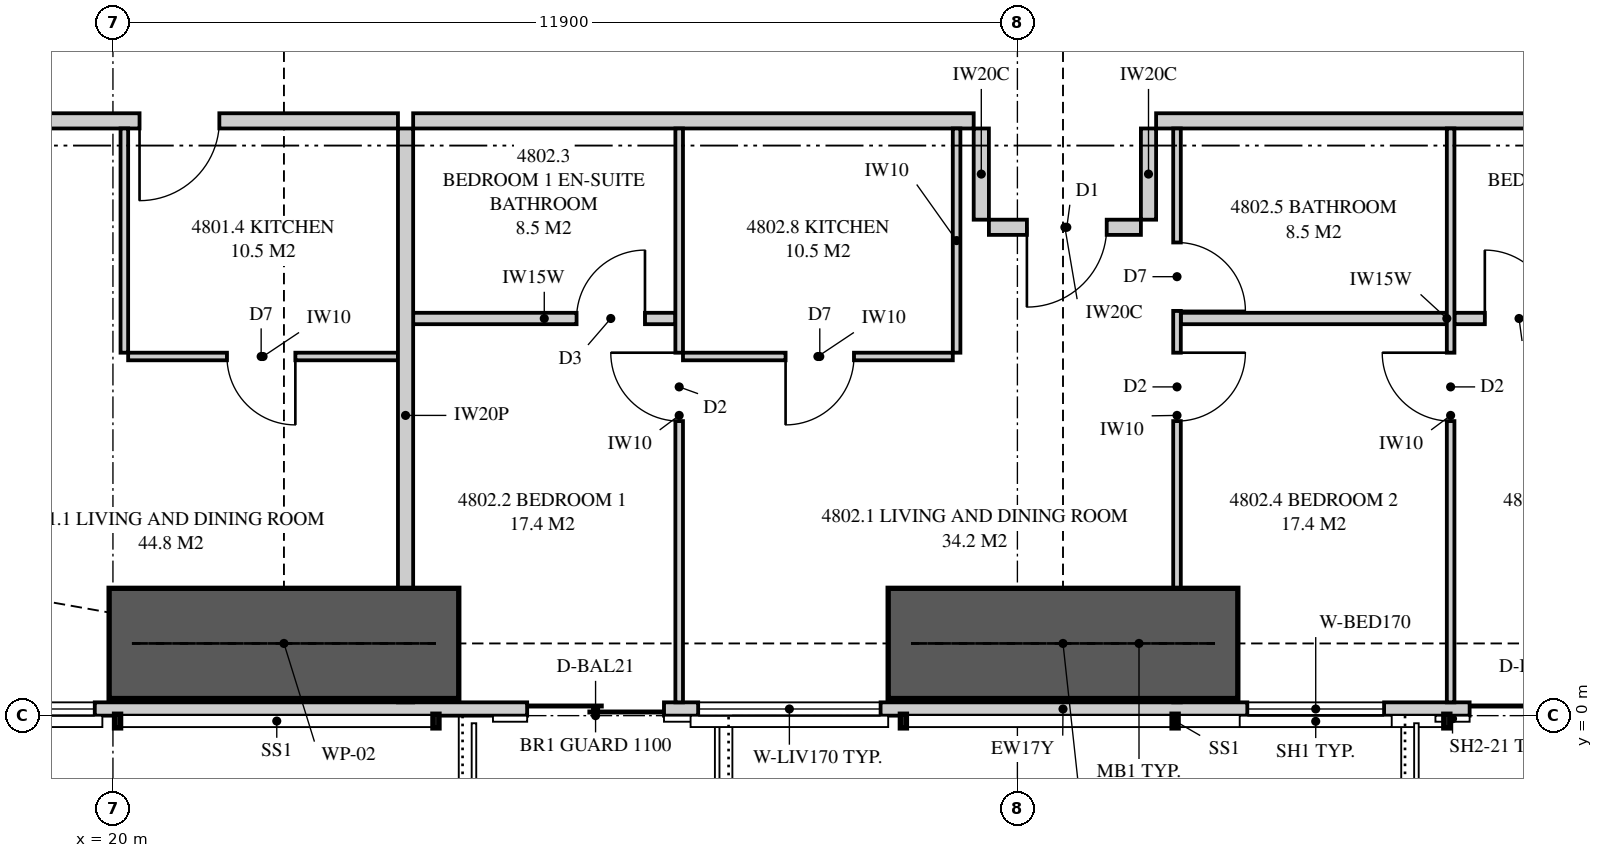
"""IFC4 building model, lengths in metres.
Left out: names, types, materials, properties, quantities, classifications, styles, units other than length and angle.
Written with IfcOpenShell. Run it as: python <this file> out.ifc"""

import sys

from ifc_helpers import new_model, si_unit, direction, frame, frame_2d, origin, place, context, subcontext, project, spatial, polyline, rectangle, outline, extrude, element, fill, save


model = new_model("IFC4")
c1 = context("Model", 3, precision=1e-05, world=origin(), true_north=direction((0.0, 1.0)))
c2 = subcontext(c1, "Body", "Model", "MODEL_VIEW")
j1 = project(units=[si_unit("LENGTHUNIT", "METRE"), si_unit("PLANEANGLEUNIT", "RADIAN")], contexts=[c1])
p1 = place(None, origin())
s1 = spatial("IfcSite", under=j1, at=p1, CompositionType="ELEMENT")
p2 = place(p1, origin())
s2 = spatial("IfcBuilding", under=s1, at=p2, CompositionType="ELEMENT")
p3 = place(p2, frame((0.0, 0.0, 177.8)))
s3 = spatial("IfcBuildingStorey", under=s2, at=p3, CompositionType="ELEMENT", Elevation=177.8)
p4 = place(p3, frame((15.051, 0.087, 0.0), z_axis=(0.0, 0.0, 1.0), x_axis=(1.0, 0.0, 0.0)))
e1 = element("IfcWall", 1, at=p4, inside=s3, PredefinedType="SOLIDWALL", context=c2, shape_type="SweptSolid", body=[
    extrude(outline(polyline([(0.0, 0.0), (34.897, 0.0), (34.897, 3.11), (27.91, 3.11), (27.91, 2.15), (27.836, 2.15), (27.836, 3.11), (27.699, 3.11), (27.699, 2.15), (7.199, 2.15), (7.199, 3.11), (7.062, 3.11), (7.062, 2.15), (6.987, 2.15), (6.987, 3.11), (0.0, 3.11), (0.0, 0.0)])), frame((0.0, 0.087, 0.0), z_axis=(0.0, -1.0, 0.0), x_axis=(1.0, 0.0, 0.0)), (0.0, 0.0, 1.0), 0.175),
])
p5 = place(p4, frame((2.31, 0.0, 0.4)))
e2 = element("IfcOpeningElement", 2, at=p5, cuts=e1, PredefinedType="OPENING", context=c2, shape_type="SweptSolid", body=[
    extrude(rectangle(XDim=2.4, YDim=1.7, at=frame_2d((1.2, 0.85))), frame((0.0, 0.097, 0.0), z_axis=(0.0, -1.0, 0.0), x_axis=(1.0, 0.0, 0.0)), (0.0, 0.0, 1.0), 0.195),
])
p6 = place(p4, frame((10.399, 0.0, 0.0)))
e3 = element("IfcOpeningElement", 3, at=p6, cuts=e1, PredefinedType="OPENING", context=c2, shape_type="SweptSolid", body=[
    extrude(rectangle(XDim=1.8, YDim=2.1, at=frame_2d((0.9, 1.05))), frame((0.0, 0.097, 0.0), z_axis=(0.0, -1.0, 0.0), x_axis=(1.0, 0.0, 0.0)), (0.0, 0.0, 1.0), 0.195),
])
p7 = place(p4, frame((12.649, 0.0, 0.4)))
e4 = element("IfcOpeningElement", 4, at=p7, cuts=e1, PredefinedType="OPENING", context=c2, shape_type="SweptSolid", body=[
    extrude(rectangle(XDim=2.4, YDim=1.7, at=frame_2d((1.2, 0.85))), frame((0.0, 0.097, 0.0), z_axis=(0.0, -1.0, 0.0), x_axis=(1.0, 0.0, 0.0)), (0.0, 0.0, 1.0), 0.195),
])
p8 = place(p4, frame((19.874, 0.0, 0.4)))
e5 = element("IfcOpeningElement", 5, at=p8, cuts=e1, PredefinedType="OPENING", context=c2, shape_type="SweptSolid", body=[
    extrude(rectangle(XDim=1.8, YDim=1.7, at=frame_2d((0.9, 0.85))), frame((0.0, 0.097, 0.0), z_axis=(0.0, -1.0, 0.0), x_axis=(1.0, 0.0, 0.0)), (0.0, 0.0, 1.0), 0.195),
])
p9 = place(p4, frame((22.799, 0.0, 0.0)))
e6 = element("IfcOpeningElement", 6, at=p9, cuts=e1, PredefinedType="OPENING", context=c2, shape_type="SweptSolid", body=[
    extrude(rectangle(XDim=1.8, YDim=2.1, at=frame_2d((0.9, 1.05))), frame((0.0, 0.097, 0.0), z_axis=(0.0, -1.0, 0.0), x_axis=(1.0, 0.0, 0.0)), (0.0, 0.0, 1.0), 0.195),
])
p10 = place(p4, frame((30.205, 0.0, 0.4)))
e7 = element("IfcOpeningElement", 7, at=p10, cuts=e1, PredefinedType="OPENING", context=c2, shape_type="SweptSolid", body=[
    extrude(rectangle(XDim=2.4, YDim=1.7, at=frame_2d((1.2, 0.85))), frame((0.0, 0.097, 0.0), z_axis=(0.0, -1.0, 0.0), x_axis=(1.0, 0.0, 0.0)), (0.0, 0.0, 1.0), 0.195),
])
p11 = place(p3, frame((23.85, 0.175, 0.0), z_axis=(0.0, 0.0, 1.0), x_axis=(0.0, 1.0, 0.0)))
e8 = element("IfcWall", 8, at=p11, inside=s3, PredefinedType="PARTITIONING", context=c2, shape_type="SweptSolid", body=[
    extrude(outline(polyline([(0.529, 2.15), (0.0, 2.15), (0.0, 0.0), (0.529, 0.0), (0.529, 0.206), (1.021, 0.206), (1.021, 0.0), (7.55, 0.0), (7.55, 3.11), (1.685, 3.11), (1.685, 2.15), (1.021, 2.15), (1.021, 1.944), (0.529, 1.944), (0.529, 2.15)])), frame((0.0, 0.1, 0.0), z_axis=(0.0, -1.0, 0.0), x_axis=(1.0, 0.0, 0.0)), (0.0, 0.0, 1.0), 0.2),
])
p12 = place(p3, frame((17.85, 7.825, 0.0), z_axis=(0.0, 0.0, 1.0), x_axis=(1.0, 0.0, 0.0)))
e9 = element("IfcWall", 9, at=p12, inside=s3, PredefinedType="PARTITIONING", context=c2, shape_type="SweptSolid", body=[
    extrude(outline(polyline([(0.0, 0.0), (5.9, 0.0), (5.9, 3.11), (4.737, 3.11), (4.737, 2.541), (4.062, 2.541), (4.062, 3.11), (0.0, 3.11), (0.0, 0.0)])), frame((0.0, 0.1, 0.0), z_axis=(0.0, -1.0, 0.0), x_axis=(1.0, 0.0, 0.0)), (0.0, 0.0, 1.0), 0.2),
])
p13 = place(p12, frame((2.5, 0.0, 0.0)))
e10 = element("IfcOpeningElement", 10, at=p13, cuts=e9, PredefinedType="OPENING", context=c2, shape_type="SweptSolid", body=[
    extrude(rectangle(XDim=1.05, YDim=2.2, at=frame_2d((0.525, 1.1))), frame((0.0, 0.11, 0.0), z_axis=(0.0, -1.0, 0.0), x_axis=(1.0, 0.0, 0.0)), (0.0, 0.0, 1.0), 0.22),
])
p14 = place(p3, frame((20.2, 4.725, 0.0), z_axis=(0.0, 0.0, 1.0), x_axis=(1.0, 0.0, 0.0)))
e11 = element("IfcWall", 11, at=p14, inside=s3, PredefinedType="PARTITIONING", context=c2, shape_type="SweptSolid", body=[
    extrude(outline(polyline([(0.0, 0.0), (3.55, 0.0), (3.55, 3.11), (2.337, 3.11), (2.337, 2.541), (1.763, 2.541), (1.763, 3.11), (0.0, 3.11), (0.0, 0.0)])), frame((0.0, 0.05, 0.0), z_axis=(0.0, -1.0, 0.0), x_axis=(1.0, 0.0, 0.0)), (0.0, 0.0, 1.0), 0.1),
])
p15 = place(p14, frame((1.3, 0.0, 0.0)))
e12 = element("IfcOpeningElement", 12, at=p15, cuts=e11, PredefinedType="OPENING", context=c2, shape_type="SweptSolid", body=[
    extrude(rectangle(XDim=0.9, YDim=2.1, at=frame_2d((0.45, 1.05))), frame((0.0, 0.06, 0.0), z_axis=(0.0, -1.0, 0.0), x_axis=(1.0, 0.0, 0.0)), (0.0, 0.0, 1.0), 0.12),
])
p16 = place(p3, frame((20.15, 4.775, 0.0), z_axis=(0.0, 0.0, 1.0), x_axis=(0.0, 1.0, 0.0)))
e13 = element("IfcWall", 13, at=p16, inside=s3, PredefinedType="PARTITIONING", context=c2, shape_type="SweptSolid", body=[
    extrude(rectangle(XDim=2.95, YDim=0.1, at=frame_2d((1.475, 0.0))), origin(), (0.0, 0.0, 1.0), 3.11),
])
p17 = place(p3, frame((23.95, 7.825, 0.0), z_axis=(0.0, 0.0, 1.0), x_axis=(1.0, 0.0, 0.0)))
e14 = element("IfcWall", 14, at=p17, inside=s3, PredefinedType="PARTITIONING", context=c2, shape_type="SweptSolid", body=[
    extrude(rectangle(XDim=7.375, YDim=0.2, at=frame_2d((3.688, 0.0))), origin(), (0.0, 0.0, 1.0), 3.11),
])
p18 = place(p3, frame((27.45, 0.175, 0.0), z_axis=(0.0, 0.0, 1.0), x_axis=(0.0, 1.0, 0.0)))
e15 = element("IfcWall", 15, at=p18, inside=s3, PredefinedType="PARTITIONING", context=c2, shape_type="SweptSolid", body=[
    extrude(outline(polyline([(0.0, 0.0), (7.55, 0.0), (7.55, 3.11), (1.635, 3.11), (1.635, 2.15), (0.0, 2.15), (0.0, 3.11), (0.0, 0.0)])), frame((0.0, 0.05, 0.0), z_axis=(0.0, -1.0, 0.0), x_axis=(1.0, 0.0, 0.0)), (0.0, 0.0, 1.0), 0.1),
])
p19 = place(p18, frame((3.7, 0.0, 0.0)))
e16 = element("IfcOpeningElement", 16, at=p19, cuts=e15, PredefinedType="OPENING", context=c2, shape_type="SweptSolid", body=[
    extrude(rectangle(XDim=0.9, YDim=2.1, at=frame_2d((0.45, 1.05))), frame((0.0, 0.06, 0.0), z_axis=(0.0, -1.0, 0.0), x_axis=(1.0, 0.0, 0.0)), (0.0, 0.0, 1.0), 0.12),
])
p20 = place(p3, frame((34.0, 0.175, 0.0), z_axis=(0.0, 0.0, 1.0), x_axis=(0.0, 1.0, 0.0)))
e17 = element("IfcWall", 17, at=p20, inside=s3, PredefinedType="PARTITIONING", context=c2, shape_type="SweptSolid", body=[
    extrude(outline(polyline([(0.529, 2.15), (0.0, 2.15), (0.0, 0.0), (0.529, 0.0), (0.529, 0.248), (1.021, 0.248), (1.021, 0.0), (7.55, 0.0), (7.55, 3.11), (1.635, 3.11), (1.635, 2.15), (1.021, 2.15), (1.021, 1.902), (0.529, 1.902), (0.529, 2.15)])), frame((0.0, 0.05, 0.0), z_axis=(0.0, -1.0, 0.0), x_axis=(1.0, 0.0, 0.0)), (0.0, 0.0, 1.0), 0.1),
])
p21 = place(p20, frame((3.7, 0.0, 0.0)))
e18 = element("IfcOpeningElement", 18, at=p21, cuts=e17, PredefinedType="OPENING", context=c2, shape_type="SweptSolid", body=[
    extrude(rectangle(XDim=0.9, YDim=2.1, at=frame_2d((0.45, 1.05))), frame((0.0, 0.06, 0.0), z_axis=(0.0, -1.0, 0.0), x_axis=(1.0, 0.0, 0.0)), (0.0, 0.0, 1.0), 0.12),
])
p22 = place(p20, frame((5.15, 0.0, 0.0)))
e19 = element("IfcOpeningElement", 19, at=p22, cuts=e17, PredefinedType="OPENING", context=c2, shape_type="SweptSolid", body=[
    extrude(rectangle(XDim=0.9, YDim=2.1, at=frame_2d((0.45, 1.05))), frame((0.0, 0.06, 0.0), z_axis=(0.0, -1.0, 0.0), x_axis=(1.0, 0.0, 0.0)), (0.0, 0.0, 1.0), 0.12),
])
p23 = place(p3, frame((37.6, 0.175, 0.0), z_axis=(0.0, 0.0, 1.0), x_axis=(0.0, 1.0, 0.0)))
e20 = element("IfcWall", 20, at=p23, inside=s3, PredefinedType="PARTITIONING", context=c2, shape_type="SweptSolid", body=[
    extrude(outline(polyline([(0.0, 0.0), (7.55, 0.0), (7.55, 3.11), (1.635, 3.11), (1.635, 2.15), (0.0, 2.15), (0.0, 3.11), (0.0, 0.0)])), frame((0.0, 0.05, 0.0), z_axis=(0.0, -1.0, 0.0), x_axis=(1.0, 0.0, 0.0)), (0.0, 0.0, 1.0), 0.1),
])
p24 = place(p23, frame((3.7, 0.0, 0.0)))
e21 = element("IfcOpeningElement", 21, at=p24, cuts=e20, PredefinedType="OPENING", context=c2, shape_type="SweptSolid", body=[
    extrude(rectangle(XDim=0.9, YDim=2.1, at=frame_2d((0.45, 1.05))), frame((0.0, 0.06, 0.0), z_axis=(0.0, -1.0, 0.0), x_axis=(1.0, 0.0, 0.0)), (0.0, 0.0, 1.0), 0.12),
])
p25 = place(p3, frame((23.95, 5.225, 0.0), z_axis=(0.0, 0.0, 1.0), x_axis=(1.0, 0.0, 0.0)))
e22 = element("IfcWall", 22, at=p25, inside=s3, PredefinedType="PLUMBINGWALL", context=c2, shape_type="SweptSolid", body=[
    extrude(rectangle(XDim=3.45, YDim=0.15, at=frame_2d((1.725, 0.0))), origin(), (0.0, 0.0, 1.0), 3.11),
])
p26 = place(p25, frame((2.15, 0.0, 0.0)))
e23 = element("IfcOpeningElement", 23, at=p26, cuts=e22, PredefinedType="OPENING", context=c2, shape_type="SweptSolid", body=[
    extrude(rectangle(XDim=0.9, YDim=2.1, at=frame_2d((0.45, 1.05))), frame((0.0, 0.085, 0.0), z_axis=(0.0, -1.0, 0.0), x_axis=(1.0, 0.0, 0.0)), (0.0, 0.0, 1.0), 0.17),
])
p27 = place(p3, frame((34.05, 5.225, 0.0), z_axis=(0.0, 0.0, 1.0), x_axis=(1.0, 0.0, 0.0)))
e24 = element("IfcWall", 24, at=p27, inside=s3, PredefinedType="PLUMBINGWALL", context=c2, shape_type="SweptSolid", body=[
    extrude(rectangle(XDim=3.5, YDim=0.15, at=frame_2d((1.75, 0.0))), origin(), (0.0, 0.0, 1.0), 3.11),
])
p28 = place(p3, frame((37.65, 5.225, 0.0), z_axis=(0.0, 0.0, 1.0), x_axis=(1.0, 0.0, 0.0)))
e25 = element("IfcWall", 25, at=p28, inside=s3, PredefinedType="PLUMBINGWALL", context=c2, shape_type="SweptSolid", body=[
    extrude(rectangle(XDim=3.45, YDim=0.15, at=frame_2d((1.725, 0.0))), origin(), (0.0, 0.0, 1.0), 3.11),
])
p29 = place(p28, frame((0.4, 0.0, 0.0)))
e26 = element("IfcOpeningElement", 26, at=p29, cuts=e25, PredefinedType="OPENING", context=c2, shape_type="SweptSolid", body=[
    extrude(rectangle(XDim=0.9, YDim=2.1, at=frame_2d((0.45, 1.05))), frame((0.0, 0.085, 0.0), z_axis=(0.0, -1.0, 0.0), x_axis=(1.0, 0.0, 0.0)), (0.0, 0.0, 1.0), 0.17),
])
p30 = place(p3, frame((27.5, 4.725, 0.0), z_axis=(0.0, 0.0, 1.0), x_axis=(1.0, 0.0, 0.0)))
e27 = element("IfcWall", 27, at=p30, inside=s3, PredefinedType="PARTITIONING", context=c2, shape_type="SweptSolid", body=[
    extrude(rectangle(XDim=3.55, YDim=0.1, at=frame_2d((1.775, 0.0))), origin(), (0.0, 0.0, 1.0), 3.11),
])
p31 = place(p30, frame((1.35, 0.0, 0.0)))
e28 = element("IfcOpeningElement", 28, at=p31, cuts=e27, PredefinedType="OPENING", context=c2, shape_type="SweptSolid", body=[
    extrude(rectangle(XDim=0.9, YDim=2.1, at=frame_2d((0.45, 1.05))), frame((0.0, 0.06, 0.0), z_axis=(0.0, -1.0, 0.0), x_axis=(1.0, 0.0, 0.0)), (0.0, 0.0, 1.0), 0.12),
])
p32 = place(p3, frame((31.1, 4.775, 0.0), z_axis=(0.0, 0.0, 1.0), x_axis=(0.0, 1.0, 0.0)))
e29 = element("IfcWall", 29, at=p32, inside=s3, PredefinedType="PARTITIONING", context=c2, shape_type="SweptSolid", body=[
    extrude(rectangle(XDim=2.95, YDim=0.1, at=frame_2d((1.475, 0.0))), origin(), (0.0, 0.0, 1.0), 3.11),
])
p33 = place(p3, frame((33.725, 7.825, 0.0), z_axis=(0.0, 0.0, 1.0), x_axis=(1.0, 0.0, 0.0)))
e30 = element("IfcWall", 30, at=p33, inside=s3, PredefinedType="PARTITIONING", context=c2, shape_type="SweptSolid", body=[
    extrude(rectangle(XDim=7.375, YDim=0.2, at=frame_2d((3.688, 0.0))), origin(), (0.0, 0.0, 1.0), 3.11),
])
p34 = place(p3, frame((31.525, 6.425, 0.0), z_axis=(0.0, 0.0, 1.0), x_axis=(1.0, 0.0, 0.0)))
e31 = element("IfcWall", 31, at=p34, inside=s3, PredefinedType="PARTITIONING", context=c2, shape_type="SweptSolid", body=[
    extrude(outline(polyline([(0.0, 0.0), (2.0, 0.0), (2.0, 3.11), (1.312, 3.11), (1.312, 2.541), (0.638, 2.541), (0.638, 3.11), (0.0, 3.11), (0.0, 0.0)])), frame((0.0, 0.1, 0.0), z_axis=(0.0, -1.0, 0.0), x_axis=(1.0, 0.0, 0.0)), (0.0, 0.0, 1.0), 0.2),
])
p35 = place(p34, frame((0.5, 0.0, 0.0)))
e32 = element("IfcOpeningElement", 32, at=p35, cuts=e31, PredefinedType="OPENING", context=c2, shape_type="SweptSolid", body=[
    extrude(rectangle(XDim=1.05, YDim=2.2, at=frame_2d((0.525, 1.1))), frame((0.0, 0.11, 0.0), z_axis=(0.0, -1.0, 0.0), x_axis=(1.0, 0.0, 0.0)), (0.0, 0.0, 1.0), 0.22),
])
for number, where, z_axis, x_axis in (
    (33, (31.425, 7.725, 0.0), (0.0, 0.0, 1.0), (0.0, -1.0, 0.0)),
    (34, (33.625, 7.725, 0.0), (0.0, 0.0, 1.0), (0.0, -1.0, 0.0)),
):
    element("IfcWall", number, at=place(p3, frame(where, z_axis=z_axis, x_axis=x_axis)), inside=s3, PredefinedType="PARTITIONING", context=c2, shape_type="SweptSolid", body=[
        extrude(rectangle(XDim=1.2, YDim=0.2, at=frame_2d((0.6, 0.0))), origin(), (0.0, 0.0, 1.0), 3.11),
    ])
for number, where, z_axis, x_axis in (
    (35, (19.95, 0.95, 0.0), (0.0, 0.0, 1.0), (1.0, 0.0, 0.0)),
    (36, (30.2, 0.95, 0.0), (0.0, 0.0, 1.0), (1.0, 0.0, 0.0)),
):
    element("IfcWall", number, at=place(p3, frame(where, z_axis=z_axis, x_axis=x_axis)), inside=s3, PredefinedType="SHEAR", context=c2, shape_type="SweptSolid", body=[
        extrude(rectangle(XDim=4.6, YDim=1.45, at=frame_2d((2.3, 0.0))), origin(), (0.0, 0.0, 1.0), 3.35),
    ])
p36 = place(p5, origin())
e37 = element("IfcWindow", 37, at=p36, inside=s3, PartitioningType="SINGLE_PANEL", PredefinedType="WINDOW", context=c2, shape_type="SweptSolid", body=[
    extrude(rectangle(XDim=2.4, YDim=1.7, at=frame_2d((1.2, 0.85))), frame((0.0, 0.03, 0.0), z_axis=(0.0, -1.0, 0.0), x_axis=(1.0, 0.0, 0.0)), (0.0, 0.0, 1.0), 0.06),
])
fill(e2, e37)
p37 = place(p6, origin())
e38 = element("IfcDoor", 38, at=p37, inside=s3, OperationType="SLIDING_TO_LEFT", PredefinedType="DOOR", context=c2, shape_type="SweptSolid", body=[
    extrude(rectangle(XDim=1.8, YDim=2.1, at=frame_2d((0.9, 1.05))), frame((0.0, 0.025, 0.0), z_axis=(0.0, -1.0, 0.0), x_axis=(1.0, 0.0, 0.0)), (0.0, 0.0, 1.0), 0.05),
])
fill(e3, e38)
p38 = place(p7, origin())
e39 = element("IfcWindow", 39, at=p38, inside=s3, PartitioningType="SINGLE_PANEL", PredefinedType="WINDOW", context=c2, shape_type="SweptSolid", body=[
    extrude(rectangle(XDim=2.4, YDim=1.7, at=frame_2d((1.2, 0.85))), frame((0.0, 0.03, 0.0), z_axis=(0.0, -1.0, 0.0), x_axis=(1.0, 0.0, 0.0)), (0.0, 0.0, 1.0), 0.06),
])
fill(e4, e39)
p39 = place(p8, origin())
e40 = element("IfcWindow", 40, at=p39, inside=s3, PartitioningType="SINGLE_PANEL", PredefinedType="WINDOW", context=c2, shape_type="SweptSolid", body=[
    extrude(rectangle(XDim=1.8, YDim=1.7, at=frame_2d((0.9, 0.85))), frame((0.0, 0.03, 0.0), z_axis=(0.0, -1.0, 0.0), x_axis=(1.0, 0.0, 0.0)), (0.0, 0.0, 1.0), 0.06),
])
fill(e5, e40)
p40 = place(p9, origin())
e41 = element("IfcDoor", 41, at=p40, inside=s3, OperationType="SLIDING_TO_LEFT", PredefinedType="DOOR", context=c2, shape_type="SweptSolid", body=[
    extrude(rectangle(XDim=1.8, YDim=2.1, at=frame_2d((0.9, 1.05))), frame((0.0, 0.025, 0.0), z_axis=(0.0, -1.0, 0.0), x_axis=(1.0, 0.0, 0.0)), (0.0, 0.0, 1.0), 0.05),
])
fill(e6, e41)
p41 = place(p13, frame((1.05, 0.0, 0.0), z_axis=(0.0, 0.0, 1.0), x_axis=(-1.0, 0.0, 0.0)))
e42 = element("IfcDoor", 42, at=p41, inside=s3, OperationType="SINGLE_SWING_RIGHT", PredefinedType="DOOR", context=c2, shape_type="SweptSolid", body=[
    extrude(rectangle(XDim=1.05, YDim=2.2, at=frame_2d((0.525, 1.1))), frame((0.0, 0.025, 0.0), z_axis=(0.0, -1.0, 0.0), x_axis=(1.0, 0.0, 0.0)), (0.0, 0.0, 1.0), 0.05),
])
fill(e10, e42)
p42 = place(p15, frame((0.9, 0.0, 0.0), z_axis=(0.0, 0.0, 1.0), x_axis=(-1.0, 0.0, 0.0)))
e43 = element("IfcDoor", 43, at=p42, inside=s3, OperationType="SINGLE_SWING_LEFT", PredefinedType="DOOR", context=c2, shape_type="SweptSolid", body=[
    extrude(rectangle(XDim=0.9, YDim=2.1, at=frame_2d((0.45, 1.05))), frame((0.0, 0.025, 0.0), z_axis=(0.0, -1.0, 0.0), x_axis=(1.0, 0.0, 0.0)), (0.0, 0.0, 1.0), 0.05),
])
fill(e12, e43)
p43 = place(p35, frame((1.05, 0.0, 0.0), z_axis=(0.0, 0.0, 1.0), x_axis=(-1.0, 0.0, 0.0)))
e44 = element("IfcDoor", 44, at=p43, inside=s3, OperationType="SINGLE_SWING_RIGHT", PredefinedType="DOOR", context=c2, shape_type="SweptSolid", body=[
    extrude(rectangle(XDim=1.05, YDim=2.2, at=frame_2d((0.525, 1.1))), frame((0.0, 0.025, 0.0), z_axis=(0.0, -1.0, 0.0), x_axis=(1.0, 0.0, 0.0)), (0.0, 0.0, 1.0), 0.05),
])
fill(e32, e44)
p44 = place(p19, origin())
e45 = element("IfcDoor", 45, at=p44, inside=s3, OperationType="SINGLE_SWING_RIGHT", PredefinedType="DOOR", context=c2, shape_type="SweptSolid", body=[
    extrude(rectangle(XDim=0.9, YDim=2.1, at=frame_2d((0.45, 1.05))), frame((0.0, 0.025, 0.0), z_axis=(0.0, -1.0, 0.0), x_axis=(1.0, 0.0, 0.0)), (0.0, 0.0, 1.0), 0.05),
])
fill(e16, e45)
p45 = place(p26, origin())
e46 = element("IfcDoor", 46, at=p45, inside=s3, OperationType="SINGLE_SWING_RIGHT", PredefinedType="DOOR", context=c2, shape_type="SweptSolid", body=[
    extrude(rectangle(XDim=0.9, YDim=2.1, at=frame_2d((0.45, 1.05))), frame((0.0, 0.025, 0.0), z_axis=(0.0, -1.0, 0.0), x_axis=(1.0, 0.0, 0.0)), (0.0, 0.0, 1.0), 0.05),
])
fill(e23, e46)
p46 = place(p21, frame((0.9, 0.0, 0.0), z_axis=(0.0, 0.0, 1.0), x_axis=(-1.0, 0.0, 0.0)))
e47 = element("IfcDoor", 47, at=p46, inside=s3, OperationType="SINGLE_SWING_LEFT", PredefinedType="DOOR", context=c2, shape_type="SweptSolid", body=[
    extrude(rectangle(XDim=0.9, YDim=2.1, at=frame_2d((0.45, 1.05))), frame((0.0, 0.025, 0.0), z_axis=(0.0, -1.0, 0.0), x_axis=(1.0, 0.0, 0.0)), (0.0, 0.0, 1.0), 0.05),
])
fill(e18, e47)
p47 = place(p22, frame((0.9, 0.0, 0.0), z_axis=(0.0, 0.0, 1.0), x_axis=(-1.0, 0.0, 0.0)))
e48 = element("IfcDoor", 48, at=p47, inside=s3, OperationType="SINGLE_SWING_RIGHT", PredefinedType="DOOR", context=c2, shape_type="SweptSolid", body=[
    extrude(rectangle(XDim=0.9, YDim=2.1, at=frame_2d((0.45, 1.05))), frame((0.0, 0.025, 0.0), z_axis=(0.0, -1.0, 0.0), x_axis=(1.0, 0.0, 0.0)), (0.0, 0.0, 1.0), 0.05),
])
fill(e19, e48)
p48 = place(p24, origin())
e49 = element("IfcDoor", 49, at=p48, inside=s3, OperationType="SINGLE_SWING_RIGHT", PredefinedType="DOOR", context=c2, shape_type="SweptSolid", body=[
    extrude(rectangle(XDim=0.9, YDim=2.1, at=frame_2d((0.45, 1.05))), frame((0.0, 0.025, 0.0), z_axis=(0.0, -1.0, 0.0), x_axis=(1.0, 0.0, 0.0)), (0.0, 0.0, 1.0), 0.05),
])
fill(e21, e49)
p49 = place(p29, origin())
e50 = element("IfcDoor", 50, at=p49, inside=s3, OperationType="SINGLE_SWING_LEFT", PredefinedType="DOOR", context=c2, shape_type="SweptSolid", body=[
    extrude(rectangle(XDim=0.9, YDim=2.1, at=frame_2d((0.45, 1.05))), frame((0.0, 0.025, 0.0), z_axis=(0.0, -1.0, 0.0), x_axis=(1.0, 0.0, 0.0)), (0.0, 0.0, 1.0), 0.05),
])
fill(e26, e50)
p50 = place(p31, frame((0.9, 0.0, 0.0), z_axis=(0.0, 0.0, 1.0), x_axis=(-1.0, 0.0, 0.0)))
e51 = element("IfcDoor", 51, at=p50, inside=s3, OperationType="SINGLE_SWING_RIGHT", PredefinedType="DOOR", context=c2, shape_type="SweptSolid", body=[
    extrude(rectangle(XDim=0.9, YDim=2.1, at=frame_2d((0.45, 1.05))), frame((0.0, 0.025, 0.0), z_axis=(0.0, -1.0, 0.0), x_axis=(1.0, 0.0, 0.0)), (0.0, 0.0, 1.0), 0.05),
])
fill(e28, e51)
save(model, sys.argv[1])
